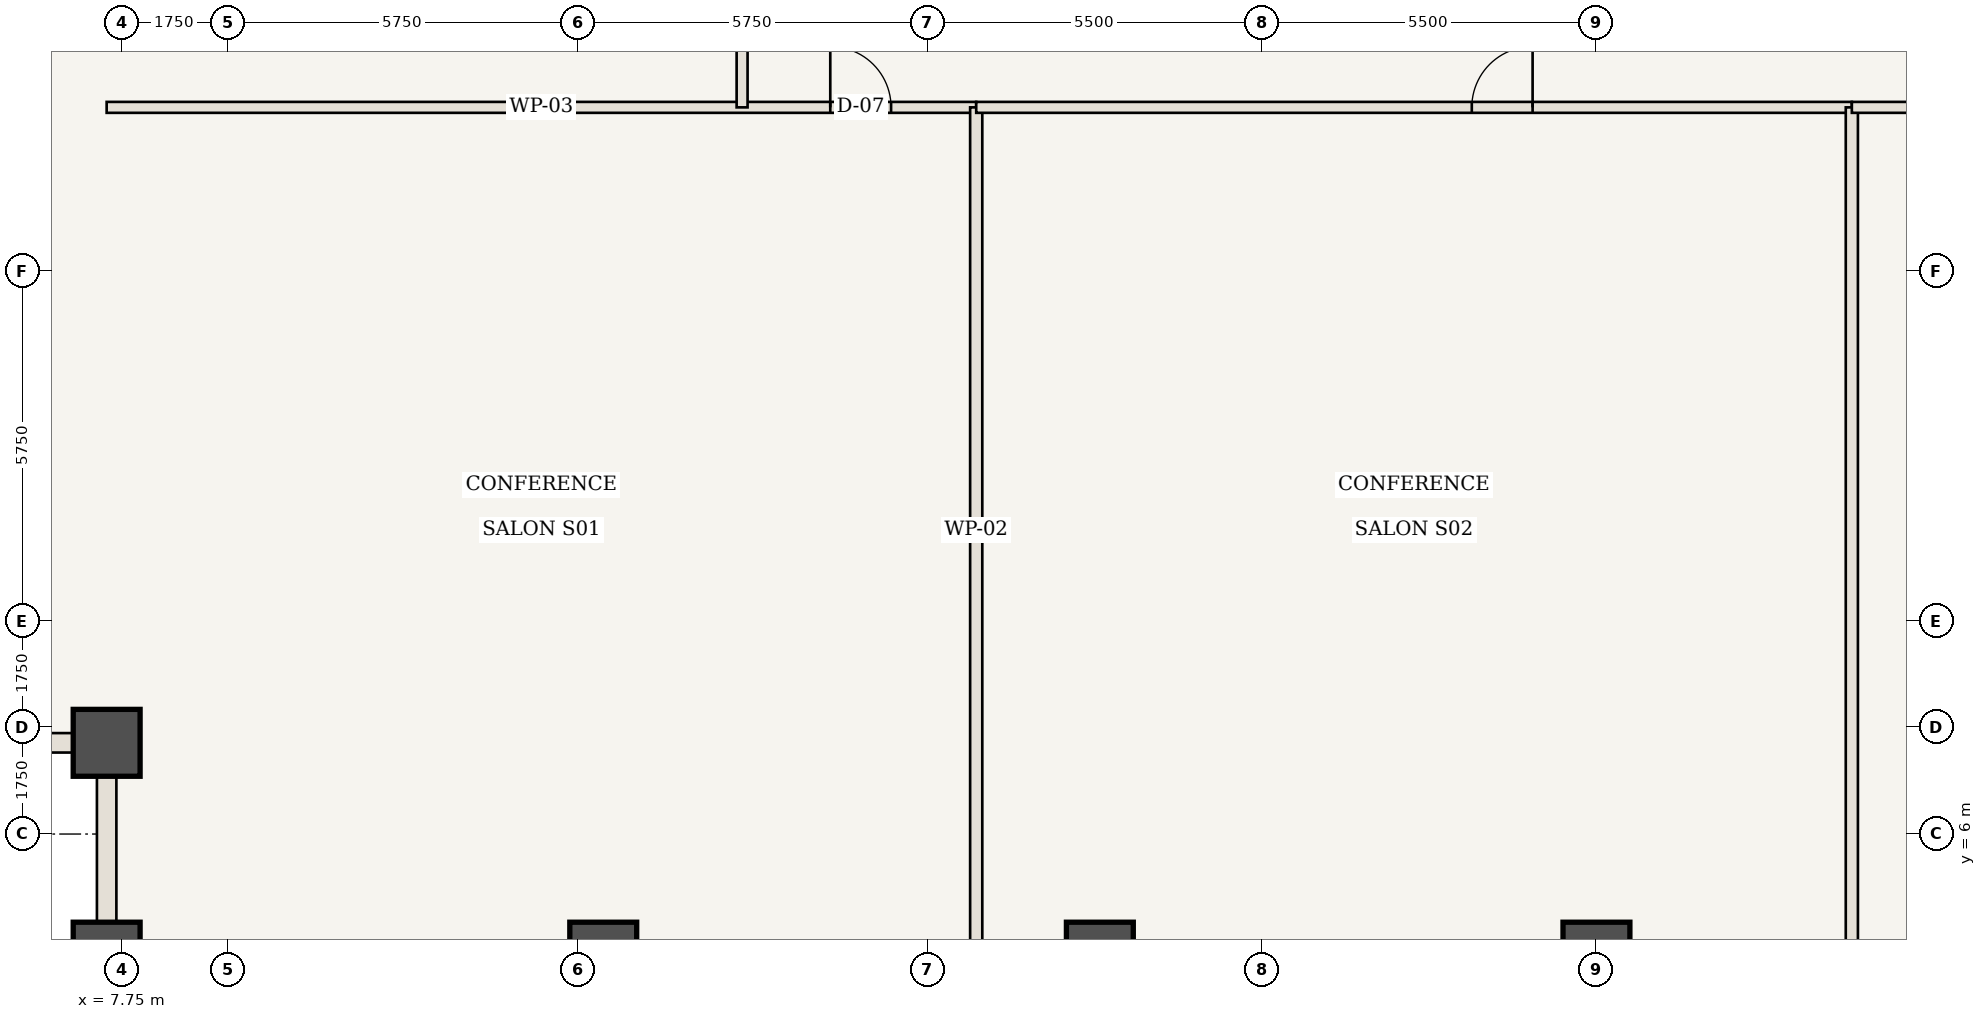
"""IFC4 building model, lengths in metres.
Left out: names, types, materials, properties, quantities, classifications, styles, units other than length and angle.
Written with IfcOpenShell. Run it as: python <this file> out.ifc"""

import sys

from ifc_helpers import new_model, si_unit, direction, frame, frame_2d, origin, origin_2d, place, context, subcontext, project, spatial, rectangle, extrude, element, fill, save


model = new_model("IFC4")
c1 = context("Model", 3, precision=1e-05, world=origin(), true_north=direction((0.0, 1.0)))
c2 = subcontext(c1, "Body", "Model", "MODEL_VIEW")
j1 = project(units=[si_unit("LENGTHUNIT", "METRE"), si_unit("PLANEANGLEUNIT", "RADIAN")], contexts=[c1])
p1 = place(None, origin())
s1 = spatial("IfcSite", under=j1, at=p1, CompositionType="ELEMENT")
p2 = place(p1, origin())
s2 = spatial("IfcBuilding", under=s1, at=p2, CompositionType="ELEMENT")
p3 = place(p2, frame((0.0, 0.0, 70.35)))
s3 = spatial("IfcBuildingStorey", under=s2, at=p3, CompositionType="ELEMENT", Elevation=70.35)
for number, where, z_axis, x_axis in (
    (1, (7.5, 4.0, 0.0), (0.0, 0.0, 1.0), (1.0, 0.0, 0.0)),
    (2, (7.5, 7.5, 0.0), (0.0, 0.0, 1.0), (1.0, 0.0, 0.0)),
    (3, (15.667, 4.0, 0.0), (0.0, 0.0, 1.0), (1.0, 0.0, 0.0)),
    (4, (23.833, 4.0, 0.0), (0.0, 0.0, 1.0), (1.0, 0.0, 0.0)),
    (5, (32.0, 4.0, 0.0), (0.0, 0.0, 1.0), (1.0, 0.0, 0.0)),
):
    element("IfcColumn", number, at=place(p3, frame(where, z_axis=z_axis, x_axis=x_axis)), inside=s3, PredefinedType="COLUMN", context=c2, shape_type="SweptSolid", body=[
        extrude(rectangle(XDim=1.1, YDim=1.1, at=origin_2d()), origin(), (0.0, 0.0, 1.0), 3.5),
    ])
p4 = place(p3, frame((7.5, 17.95, 0.0), z_axis=(0.0, 0.0, 1.0), x_axis=(1.0, 0.0, 0.0)))
e6 = element("IfcWall", 6, at=p4, inside=s3, PredefinedType="STANDARD", context=c2, shape_type="SweptSolid", body=[
    extrude(rectangle(XDim=14.3, YDim=0.18, at=frame_2d((7.15, 0.0))), origin(), (0.0, 0.0, 1.0), 3.32),
])
p5 = place(p4, frame((11.9, 0.0, 0.0)))
e7 = element("IfcOpeningElement", 7, at=p5, cuts=e6, PredefinedType="OPENING", context=c2, shape_type="SweptSolid", body=[
    extrude(rectangle(XDim=1.0, YDim=2.15, at=frame_2d((0.5, 1.075))), frame((0.0, 0.1, 0.0), z_axis=(0.0, -1.0, 0.0), x_axis=(1.0, 0.0, 0.0)), (0.0, 0.0, 1.0), 0.2),
])
p6 = place(p3, frame((21.8, 4.06, 0.0), z_axis=(0.0, 0.0, 1.0), x_axis=(0.0, 1.0, 0.0)))
e8 = element("IfcWall", 8, at=p6, inside=s3, PredefinedType="STANDARD", context=c2, shape_type="SweptSolid", body=[
    extrude(rectangle(XDim=13.89, YDim=0.2, at=frame_2d((6.945, 0.0))), origin(), (0.0, 0.0, 1.0), 3.32),
])
p7 = place(p3, frame((21.8, 17.95, 0.0), z_axis=(0.0, 0.0, 1.0), x_axis=(1.0, 0.0, 0.0)))
e9 = element("IfcWall", 9, at=p7, inside=s3, PredefinedType="STANDARD", context=c2, shape_type="SweptSolid", body=[
    extrude(rectangle(XDim=14.4, YDim=0.18, at=frame_2d((7.2, 0.0))), origin(), (0.0, 0.0, 1.0), 3.32),
])
p8 = place(p7, frame((8.15, 0.0, 0.0)))
e10 = element("IfcOpeningElement", 10, at=p8, cuts=e9, PredefinedType="OPENING", context=c2, shape_type="SweptSolid", body=[
    extrude(rectangle(XDim=1.0, YDim=2.15, at=frame_2d((0.5, 1.075))), frame((0.0, 0.1, 0.0), z_axis=(0.0, -1.0, 0.0), x_axis=(1.0, 0.0, 0.0)), (0.0, 0.0, 1.0), 0.2),
])
p9 = place(p3, frame((36.2, 4.06, 0.0), z_axis=(0.0, 0.0, 1.0), x_axis=(0.0, 1.0, 0.0)))
e11 = element("IfcWall", 11, at=p9, inside=s3, PredefinedType="STANDARD", context=c2, shape_type="SweptSolid", body=[
    extrude(rectangle(XDim=13.89, YDim=0.2, at=frame_2d((6.945, 0.0))), origin(), (0.0, 0.0, 1.0), 3.32),
])
p10 = place(p3, frame((36.2, 17.95, 0.0), z_axis=(0.0, 0.0, 1.0), x_axis=(1.0, 0.0, 0.0)))
e12 = element("IfcWall", 12, at=p10, inside=s3, PredefinedType="STANDARD", context=c2, shape_type="SweptSolid", body=[
    extrude(rectangle(XDim=20.3, YDim=0.18, at=frame_2d((10.15, 0.0))), origin(), (0.0, 0.0, 1.0), 3.32),
])
p11 = place(p10, frame((4.4, 0.0, 0.0)))
e13 = element("IfcOpeningElement", 13, at=p11, cuts=e12, PredefinedType="OPENING", context=c2, shape_type="SweptSolid", body=[
    extrude(rectangle(XDim=1.0, YDim=2.15, at=frame_2d((0.5, 1.075))), frame((0.0, 0.1, 0.0), z_axis=(0.0, -1.0, 0.0), x_axis=(1.0, 0.0, 0.0)), (0.0, 0.0, 1.0), 0.2),
])
p12 = place(p3, frame((17.95, 17.95, 0.0), z_axis=(0.0, 0.0, 1.0), x_axis=(0.0, 1.0, 0.0)))
e14 = element("IfcWall", 14, at=p12, inside=s3, PredefinedType="STANDARD", context=c2, shape_type="SweptSolid", body=[
    extrude(rectangle(XDim=15.55, YDim=0.18, at=frame_2d((7.775, 0.0))), origin(), (0.0, 0.0, 1.0), 3.32),
])
p13 = place(p12, frame((7.275, 0.0, 0.0)))
e15 = element("IfcOpeningElement", 15, at=p13, cuts=e14, PredefinedType="OPENING", context=c2, shape_type="SweptSolid", body=[
    extrude(rectangle(XDim=1.0, YDim=2.15, at=frame_2d((0.5, 1.075))), frame((0.0, 0.1, 0.0), z_axis=(0.0, -1.0, 0.0), x_axis=(1.0, 0.0, 0.0)), (0.0, 0.0, 1.0), 0.2),
])
for number, where, z_axis, x_axis in (
    (16, (7.5, 4.0, 0.0), (0.0, 0.0, 1.0), (0.0, 1.0, 0.0)),
    (17, (7.5, 7.5, 0.0), (0.0, 0.0, 1.0), (-1.0, 0.0, 0.0)),
):
    element("IfcWall", number, at=place(p3, frame(where, z_axis=z_axis, x_axis=x_axis)), inside=s3, PredefinedType="USERDEFINED", context=c2, shape_type="SweptSolid", body=[
        extrude(rectangle(XDim=3.5, YDim=0.32, at=frame_2d((1.75, 0.0))), origin(), (0.0, 0.0, 1.0), 2.52),
    ])
p14 = place(p5, origin())
e18 = element("IfcDoor", 18, at=p14, inside=s3, OperationType="SINGLE_SWING_LEFT", PredefinedType="DOOR", context=c2, shape_type="SweptSolid", body=[
    extrude(rectangle(XDim=1.0, YDim=2.15, at=frame_2d((0.5, 1.075))), frame((0.0, 0.025, 0.0), z_axis=(0.0, -1.0, 0.0), x_axis=(1.0, 0.0, 0.0)), (0.0, 0.0, 1.0), 0.05),
])
fill(e7, e18)
p15 = place(p8, origin())
e19 = element("IfcDoor", 19, at=p15, inside=s3, OperationType="SINGLE_SWING_RIGHT", PredefinedType="DOOR", context=c2, shape_type="SweptSolid", body=[
    extrude(rectangle(XDim=1.0, YDim=2.15, at=frame_2d((0.5, 1.075))), frame((0.0, 0.025, 0.0), z_axis=(0.0, -1.0, 0.0), x_axis=(1.0, 0.0, 0.0)), (0.0, 0.0, 1.0), 0.05),
])
fill(e10, e19)
save(model, sys.argv[1])
